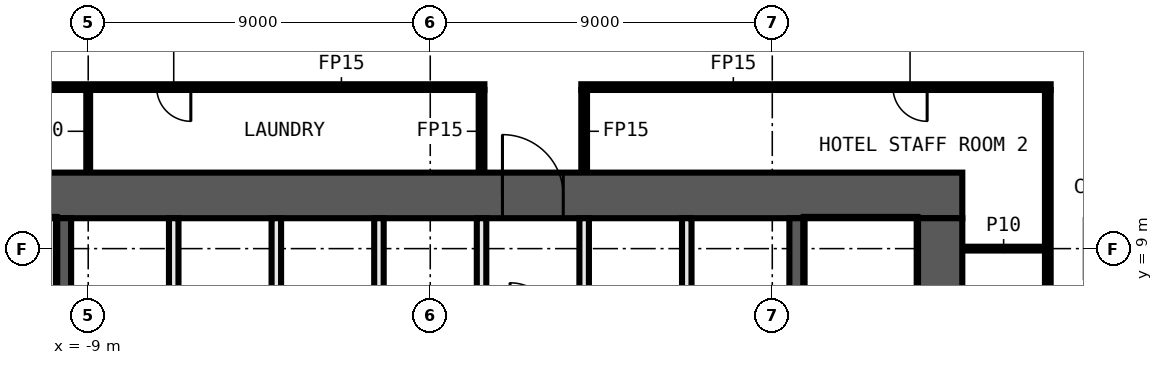
"""IFC4 building model, lengths in metres.
Left out: names, types, materials, properties, quantities, classifications, styles, units other than length and angle.
Written with IfcOpenShell. Run it as: python <this file> out.ifc"""

import sys

from ifc_helpers import new_model, si_unit, direction, frame, frame_2d, origin, place, context, subcontext, project, spatial, rectangle, extrude, element, fill, save


model = new_model("IFC4")
c1 = context("Model", 3, precision=1e-05, world=origin(), true_north=direction((0.0, 1.0)))
c2 = subcontext(c1, "Body", "Model", "MODEL_VIEW")
j1 = project(units=[si_unit("LENGTHUNIT", "METRE"), si_unit("PLANEANGLEUNIT", "RADIAN")], contexts=[c1])
p1 = place(None, origin())
s1 = spatial("IfcSite", under=j1, at=p1, CompositionType="ELEMENT")
p2 = place(p1, origin())
s2 = spatial("IfcBuilding", under=s1, at=p2, CompositionType="ELEMENT")
p3 = place(p2, frame((0.0, 0.0, 58.8)))
s3 = spatial("IfcBuildingStorey", under=s2, at=p3, CompositionType="ELEMENT", Elevation=58.8)
p4 = place(p3, frame((14.0, 9.0, 0.0), z_axis=(0.0, 0.0, 1.0), x_axis=(1.0, 0.0, 0.0)))
e1 = element("IfcWall", 1, at=p4, inside=s3, PredefinedType="PARTITIONING", context=c2, shape_type="SweptSolid", body=[
    extrude(rectangle(XDim=2.175, YDim=0.1, at=frame_2d((1.087, 0.0))), origin(), (0.0, 0.0, 1.0), 3.3),
])
p5 = place(p3, frame((1.425, 13.25, 0.0), z_axis=(0.0, 0.0, 1.0), x_axis=(-1.0, 0.0, 0.0)))
e2 = element("IfcWall", 2, at=p5, inside=s3, PredefinedType="PARTITIONING", context=c2, shape_type="SweptSolid", body=[
    extrude(rectangle(XDim=17.75, YDim=0.15, at=frame_2d((8.875, 0.0))), origin(), (0.0, 0.0, 1.0), 3.3),
])
p6 = place(p5, frame((7.725, 0.0, 0.0)))
e3 = element("IfcOpeningElement", 3, at=p6, cuts=e2, PredefinedType="OPENING", context=c2, shape_type="SweptSolid", body=[
    extrude(rectangle(XDim=0.9, YDim=2.1, at=frame_2d((0.45, 1.05))), frame((0.0, 0.085, 0.0), z_axis=(0.0, -1.0, 0.0), x_axis=(1.0, 0.0, 0.0)), (0.0, 0.0, 1.0), 0.17),
])
p7 = place(p5, frame((13.6, 0.0, 0.0)))
e4 = element("IfcOpeningElement", 4, at=p7, cuts=e2, PredefinedType="OPENING", context=c2, shape_type="SweptSolid", body=[
    extrude(rectangle(XDim=0.9, YDim=2.1, at=frame_2d((0.45, 1.05))), frame((0.0, 0.085, 0.0), z_axis=(0.0, -1.0, 0.0), x_axis=(1.0, 0.0, 0.0)), (0.0, 0.0, 1.0), 0.17),
])
p8 = place(p3, frame((16.325, 13.25, 0.0), z_axis=(0.0, 0.0, 1.0), x_axis=(-1.0, 0.0, 0.0)))
e5 = element("IfcWall", 5, at=p8, inside=s3, PredefinedType="PARTITIONING", context=c2, shape_type="SweptSolid", body=[
    extrude(rectangle(XDim=12.35, YDim=0.15, at=frame_2d((6.175, 0.0))), origin(), (0.0, 0.0, 1.0), 3.3),
])
p9 = place(p8, frame((3.25, 0.0, 0.0)))
e6 = element("IfcOpeningElement", 6, at=p9, cuts=e5, PredefinedType="OPENING", context=c2, shape_type="SweptSolid", body=[
    extrude(rectangle(XDim=0.9, YDim=2.1, at=frame_2d((0.45, 1.05))), frame((0.0, 0.085, 0.0), z_axis=(0.0, -1.0, 0.0), x_axis=(1.0, 0.0, 0.0)), (0.0, 0.0, 1.0), 0.17),
])
p10 = place(p3, frame((16.25, -13.175, 0.0), z_axis=(0.0, 0.0, 1.0), x_axis=(0.0, 1.0, 0.0)))
e7 = element("IfcWall", 7, at=p10, inside=s3, PredefinedType="PARTITIONING", context=c2, shape_type="SweptSolid", body=[
    extrude(rectangle(XDim=26.35, YDim=0.15, at=frame_2d((13.175, 0.0))), origin(), (0.0, 0.0, 1.0), 3.3),
])
p11 = place(p10, frame((19.475, 0.0, 0.0)))
e8 = element("IfcOpeningElement", 8, at=p11, cuts=e7, PredefinedType="OPENING", context=c2, shape_type="SweptSolid", body=[
    extrude(rectangle(XDim=0.9, YDim=2.1, at=frame_2d((0.45, 1.05))), frame((0.0, 0.085, 0.0), z_axis=(0.0, -1.0, 0.0), x_axis=(1.0, 0.0, 0.0)), (0.0, 0.0, 1.0), 0.17),
])
for number, where, z_axis, x_axis in (
    (9, (4.05, 11.0, 0.0), (0.0, 0.0, 1.0), (0.0, 1.0, 0.0)),
    (10, (1.35, 11.0, 0.0), (0.0, 0.0, 1.0), (0.0, 1.0, 0.0)),
):
    element("IfcWall", number, at=place(p3, frame(where, z_axis=z_axis, x_axis=x_axis)), inside=s3, PredefinedType="PARTITIONING", context=c2, shape_type="SweptSolid", body=[
        extrude(rectangle(XDim=2.175, YDim=0.15, at=frame_2d((1.087, 0.0))), origin(), (0.0, 0.0, 1.0), 3.3),
    ])
p12 = place(p3, frame((-9.0, 11.0, 0.0), z_axis=(0.0, 0.0, 1.0), x_axis=(0.0, 1.0, 0.0)))
e11 = element("IfcWall", 11, at=p12, inside=s3, PredefinedType="PARTITIONING", context=c2, shape_type="SweptSolid", body=[
    extrude(rectangle(XDim=2.175, YDim=0.1, at=frame_2d((1.087, 0.0))), origin(), (0.0, 0.0, 1.0), 3.3),
])
p13 = place(p3, frame((-14.0, 10.4, 0.0), z_axis=(0.0, 0.0, 1.0), x_axis=(1.0, 0.0, 0.0)))
e12 = element("IfcWall", 12, at=p13, inside=s3, PredefinedType="SHEAR", context=c2, shape_type="SweptSolid", body=[
    extrude(rectangle(XDim=28.0, YDim=1.2, at=frame_2d((14.0, 0.0))), origin(), (0.0, 0.0, 1.0), 3.3),
])
p14 = place(p13, frame((15.9, 0.0, 0.0)))
e13 = element("IfcOpeningElement", 13, at=p14, cuts=e12, PredefinedType="OPENING", context=c2, shape_type="SweptSolid", body=[
    extrude(rectangle(XDim=1.6, YDim=2.1, at=frame_2d((0.8, 1.05))), frame((0.0, 0.61, 0.0), z_axis=(0.0, -1.0, 0.0), x_axis=(1.0, 0.0, 0.0)), (0.0, 0.0, 1.0), 1.22),
])
p15 = place(p3, frame((13.4, 9.8, 0.0), z_axis=(0.0, 0.0, 1.0), x_axis=(0.0, -1.0, 0.0)))
e14 = element("IfcWall", 14, at=p15, inside=s3, PredefinedType="SHEAR", context=c2, shape_type="SweptSolid", body=[
    extrude(rectangle(XDim=19.6, YDim=1.2, at=frame_2d((9.8, 0.0))), origin(), (0.0, 0.0, 1.0), 3.3),
])
p16 = place(p3, frame((9.65, 9.8, 0.0), z_axis=(0.0, 0.0, 1.0), x_axis=(0.0, -1.0, 0.0)))
e15 = element("IfcWall", 15, at=p16, inside=s3, PredefinedType="SHEAR", context=c2, shape_type="SweptSolid", body=[
    extrude(rectangle(XDim=7.5, YDim=0.4, at=frame_2d((3.75, 0.0))), origin(), (0.0, 0.0, 1.0), 3.3),
])
p17 = place(p16, frame((5.1, 0.0, 0.0)))
e16 = element("IfcOpeningElement", 16, at=p17, cuts=e15, PredefinedType="OPENING", context=c2, shape_type="SweptSolid", body=[
    extrude(rectangle(XDim=1.2, YDim=2.1, at=frame_2d((0.6, 1.05))), frame((0.0, 0.21, 0.0), z_axis=(0.0, -1.0, 0.0), x_axis=(1.0, 0.0, 0.0)), (0.0, 0.0, 1.0), 0.42),
])
p18 = place(p3, frame((-9.65, 2.3, 0.0), z_axis=(0.0, 0.0, 1.0), x_axis=(0.0, 1.0, 0.0)))
e17 = element("IfcWall", 17, at=p18, inside=s3, PredefinedType="SHEAR", context=c2, shape_type="SweptSolid", body=[
    extrude(rectangle(XDim=7.5, YDim=0.4, at=frame_2d((3.75, 0.0))), origin(), (0.0, 0.0, 1.0), 3.3),
])
p19 = place(p18, frame((1.2, 0.0, 0.0)))
e18 = element("IfcOpeningElement", 18, at=p19, cuts=e17, PredefinedType="OPENING", context=c2, shape_type="SweptSolid", body=[
    extrude(rectangle(XDim=1.2, YDim=2.1, at=frame_2d((0.6, 1.05))), frame((0.0, 0.21, 0.0), z_axis=(0.0, -1.0, 0.0), x_axis=(1.0, 0.0, 0.0)), (0.0, 0.0, 1.0), 0.42),
])
for number, where, z_axis, x_axis in (
    (19, (6.75, 7.075, 0.0), (0.0, 0.0, 1.0), (0.0, 1.0, 0.0)),
    (20, (4.05, 7.075, 0.0), (0.0, 0.0, 1.0), (0.0, 1.0, 0.0)),
    (21, (1.35, 7.075, 0.0), (0.0, 0.0, 1.0), (0.0, 1.0, 0.0)),
    (22, (-1.35, 7.075, 0.0), (0.0, 0.0, 1.0), (0.0, 1.0, 0.0)),
    (23, (-4.05, 7.075, 0.0), (0.0, 0.0, 1.0), (0.0, 1.0, 0.0)),
    (24, (-6.75, 7.075, 0.0), (0.0, 0.0, 1.0), (0.0, 1.0, 0.0)),
):
    element("IfcWall", number, at=place(p3, frame(where, z_axis=z_axis, x_axis=x_axis)), inside=s3, PredefinedType="SOLIDWALL", context=c2, shape_type="SweptSolid", body=[
        extrude(rectangle(XDim=2.725, YDim=0.25, at=frame_2d((1.363, 0.0))), origin(), (0.0, 0.0, 1.0), 3.3),
    ])
p20 = place(p9, origin())
e25 = element("IfcDoor", 25, at=p20, inside=s3, OperationType="SINGLE_SWING_LEFT", PredefinedType="DOOR", context=c2, shape_type="SweptSolid", body=[
    extrude(rectangle(XDim=0.9, YDim=2.1, at=frame_2d((0.45, 1.05))), frame((0.0, 0.025, 0.0), z_axis=(0.0, -1.0, 0.0), x_axis=(1.0, 0.0, 0.0)), (0.0, 0.0, 1.0), 0.05),
])
fill(e6, e25)
p21 = place(p6, origin())
e26 = element("IfcDoor", 26, at=p21, inside=s3, OperationType="SINGLE_SWING_RIGHT", PredefinedType="DOOR", context=c2, shape_type="SweptSolid", body=[
    extrude(rectangle(XDim=0.9, YDim=2.1, at=frame_2d((0.45, 1.05))), frame((0.0, 0.025, 0.0), z_axis=(0.0, -1.0, 0.0), x_axis=(1.0, 0.0, 0.0)), (0.0, 0.0, 1.0), 0.05),
])
fill(e3, e26)
p22 = place(p14, origin())
e27 = element("IfcDoor", 27, at=p22, inside=s3, OperationType="DOUBLE_DOOR_SINGLE_SWING", PredefinedType="DOOR", context=c2, shape_type="SweptSolid", body=[
    extrude(rectangle(XDim=1.6, YDim=2.1, at=frame_2d((0.8, 1.05))), frame((0.0, 0.025, 0.0), z_axis=(0.0, -1.0, 0.0), x_axis=(1.0, 0.0, 0.0)), (0.0, 0.0, 1.0), 0.05),
])
fill(e13, e27)
save(model, sys.argv[1])
